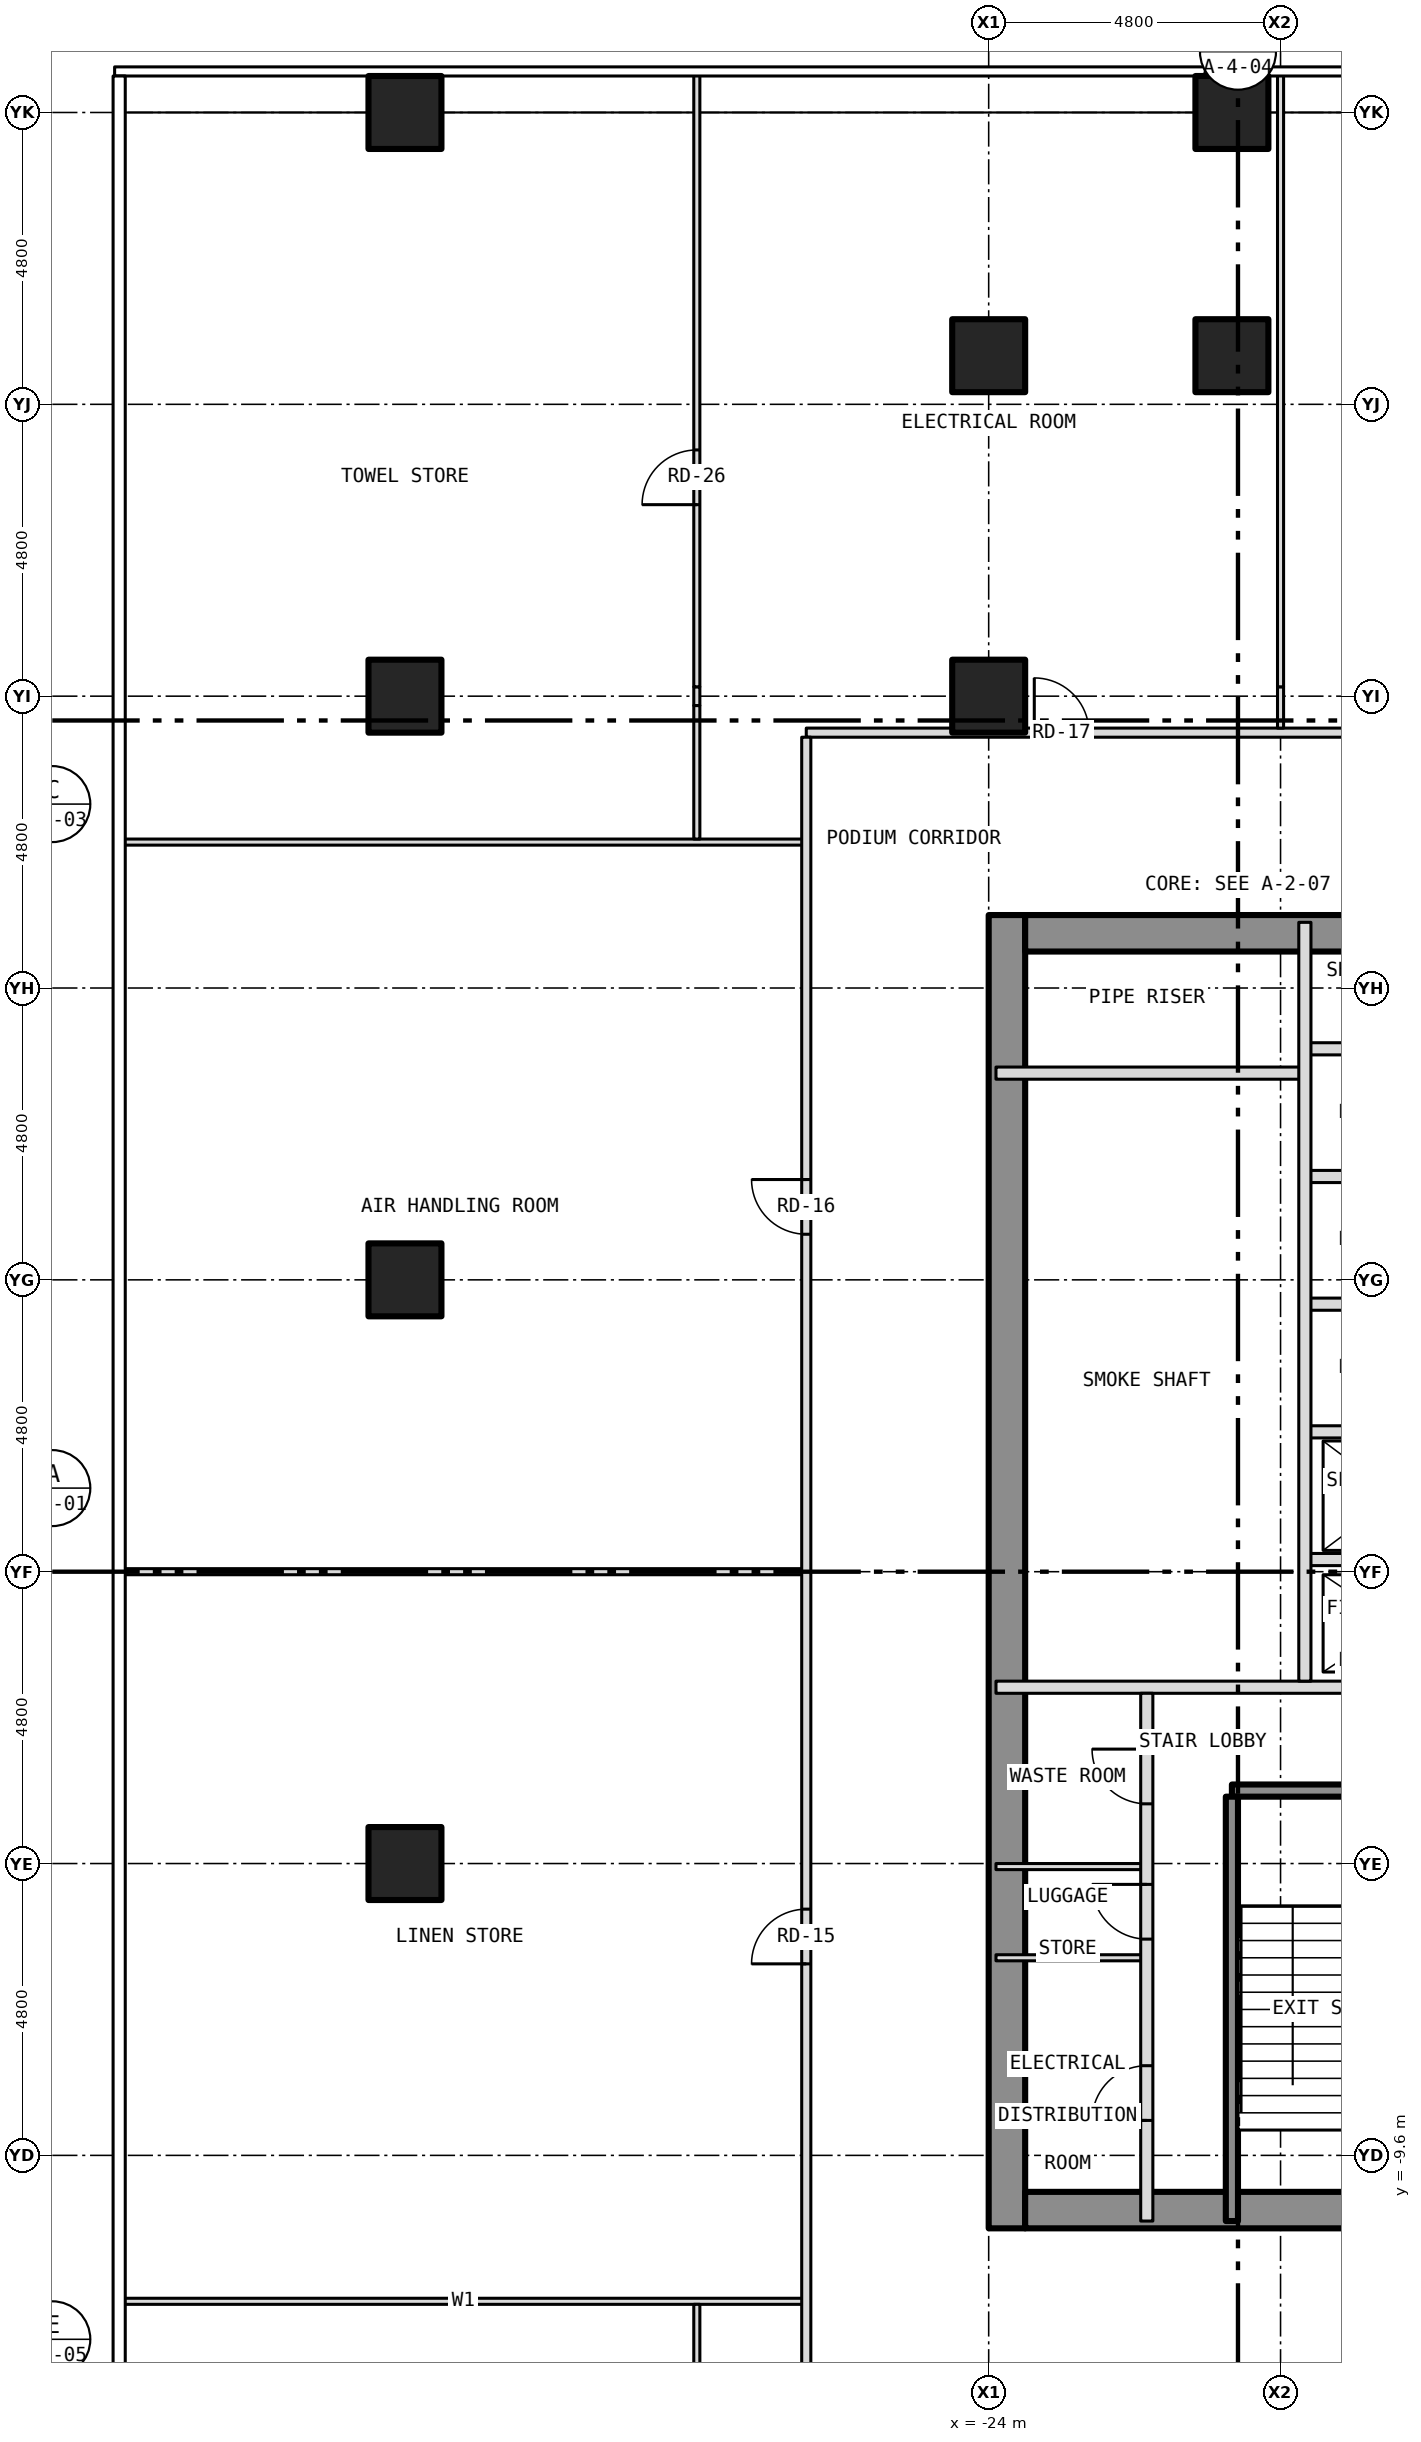
"""IFC4 building model, lengths in metres.
Left out: names, types, materials, properties, quantities, classifications, styles, units other than length and angle.
Written with IfcOpenShell. Run it as: python <this file> out.ifc"""

import sys

from ifc_helpers import new_model, si_unit, direction, frame, frame_2d, origin, origin_2d, place, context, subcontext, project, spatial, rectangle, hollow_rectangle, extrude, element, fill, save


model = new_model("IFC4")
c1 = context("Model", 3, precision=1e-05, world=origin(), true_north=direction((0.0, 1.0)))
c2 = subcontext(c1, "Body", "Model", "MODEL_VIEW")
j1 = project(units=[si_unit("LENGTHUNIT", "METRE"), si_unit("PLANEANGLEUNIT", "RADIAN")], contexts=[c1])
p1 = place(None, origin())
s1 = spatial("IfcSite", under=j1, at=p1, CompositionType="ELEMENT")
p2 = place(p1, origin())
s2 = spatial("IfcBuilding", under=s1, at=p2, CompositionType="ELEMENT")
p3 = place(p2, frame((0.0, 0.0, 24.5)))
s3 = spatial("IfcBuildingStorey", under=s2, at=p3, CompositionType="ELEMENT", Elevation=24.5)
for number, where, z_axis, x_axis in (
    (1, (-33.6, -4.8, -0.2), (0.0, 0.0, 1.0), (1.0, 0.0, 0.0)),
    (2, (-33.6, 4.8, -0.2), (0.0, 0.0, 1.0), (1.0, 0.0, 0.0)),
    (3, (-33.6, 14.4, -0.2), (0.0, 0.0, 1.0), (1.0, 0.0, 0.0)),
    (4, (-33.6, 24.0, -0.2), (0.0, 0.0, 1.0), (1.0, 0.0, 0.0)),
    (5, (-20.0, 24.0, -0.2), (0.0, 0.0, 1.0), (1.0, 0.0, 0.0)),
    (6, (-24.0, 14.4, -0.2), (0.0, 0.0, 1.0), (1.0, 0.0, 0.0)),
    (7, (-24.0, 20.0, -0.2), (0.0, 0.0, 1.0), (1.0, 0.0, 0.0)),
    (8, (-20.0, 20.0, -0.2), (0.0, 0.0, 1.0), (1.0, 0.0, 0.0)),
):
    element("IfcColumn", number, at=place(p3, frame(where, z_axis=z_axis, x_axis=x_axis)), inside=s3, PredefinedType="COLUMN", context=c2, shape_type="SweptSolid", body=[
        extrude(hollow_rectangle(XDim=1.2, YDim=1.2, WallThickness=0.07, at=origin_2d()), origin(), (0.0, 0.0, 1.0), 4.5),
    ])
p4 = place(p3, frame((-23.7, -10.8, 0.0), z_axis=(0.0, 0.0, 1.0), x_axis=(0.0, 1.0, 0.0)))
e9 = element("IfcWall", 9, at=p4, inside=s3, PredefinedType="SHEAR", context=c2, shape_type="SweptSolid", body=[
    extrude(rectangle(XDim=21.6, YDim=0.6, at=frame_2d((10.8, 0.0))), origin(), (0.0, 0.0, 1.0), 4.2),
])
for number, where, z_axis, x_axis in (
    (10, (-23.4, 10.5, 0.0), (0.0, 0.0, 1.0), (1.0, 0.0, 0.0)),
    (11, (-23.4, -10.5, 0.0), (0.0, 0.0, 1.0), (1.0, 0.0, 0.0)),
):
    element("IfcWall", number, at=place(p3, frame(where, z_axis=z_axis, x_axis=x_axis)), inside=s3, PredefinedType="SHEAR", context=c2, shape_type="SweptSolid", body=[
        extrude(rectangle(XDim=7.0, YDim=0.6, at=frame_2d((3.5, 0.0))), origin(), (0.0, 0.0, 1.0), 4.2),
    ])
p5 = place(p3, frame((-38.28, -12.0, 0.0), z_axis=(0.0, 0.0, 1.0), x_axis=(1.0, 0.0, 0.0)))
e12 = element("IfcWall", 12, at=p5, inside=s3, PredefinedType="PARTITIONING", context=c2, shape_type="SweptSolid", body=[
    extrude(rectangle(XDim=11.28, YDim=0.1, at=frame_2d((5.64, 0.0))), origin(), (0.0, 0.0, 1.0), 4.3),
])
for number, where, z_axis, x_axis in (
    (13, (-23.88, -6.35, 0.0), (0.0, 0.0, 1.0), (1.0, 0.0, 0.0)),
    (14, (-23.88, -4.85, 0.0), (0.0, 0.0, 1.0), (1.0, 0.0, 0.0)),
):
    element("IfcWall", number, at=place(p3, frame(where, z_axis=z_axis, x_axis=x_axis)), inside=s3, PredefinedType="PARTITIONING", context=c2, shape_type="SweptSolid", body=[
        extrude(rectangle(XDim=2.48, YDim=0.1, at=frame_2d((1.24, 0.0))), origin(), (0.0, 0.0, 1.0), 4.2),
    ])
p6 = place(p3, frame((-20.0, -3.6, 0.0), z_axis=(0.0, 0.0, 1.0), x_axis=(1.0, 0.0, 0.0)))
e15 = element("IfcWall", 15, at=p6, inside=s3, PredefinedType="SHEAR", context=c2, shape_type="SweptSolid", body=[
    extrude(rectangle(XDim=4.08, YDim=0.2, at=frame_2d((2.04, 0.0))), origin(), (0.0, 0.0, 1.0), 4.2),
])
p7 = place(p3, frame((-23.88, -1.9, 0.0), z_axis=(0.0, 0.0, 1.0), x_axis=(1.0, 0.0, 0.0)))
e16 = element("IfcWall", 16, at=p7, inside=s3, PredefinedType="PARTITIONING", context=c2, shape_type="SweptSolid", body=[
    extrude(rectangle(XDim=7.96, YDim=0.2, at=frame_2d((3.98, 0.0))), origin(), (0.0, 0.0, 1.0), 4.2),
])
p8 = place(p3, frame((-38.28, 0.0, 0.0), z_axis=(0.0, 0.0, 1.0), x_axis=(1.0, 0.0, 0.0)))
e17 = element("IfcWall", 17, at=p8, inside=s3, PredefinedType="PARTITIONING", context=c2, shape_type="SweptSolid", body=[
    extrude(rectangle(XDim=11.28, YDim=0.1, at=frame_2d((5.64, 0.0))), origin(), (0.0, 0.0, 1.0), 4.3),
])
for number, where, z_axis, x_axis in (
    (18, (-18.8, 0.2, 0.0), (0.0, 0.0, 1.0), (1.0, 0.0, 0.0)),
    (19, (-18.8, 2.3, 0.0), (0.0, 0.0, 1.0), (1.0, 0.0, 0.0)),
    (20, (-18.8, 4.4, 0.0), (0.0, 0.0, 1.0), (1.0, 0.0, 0.0)),
    (21, (-18.8, 6.5, 0.0), (0.0, 0.0, 1.0), (1.0, 0.0, 0.0)),
):
    element("IfcWall", number, at=place(p3, frame(where, z_axis=z_axis, x_axis=x_axis)), inside=s3, PredefinedType="PARTITIONING", context=c2, shape_type="SweptSolid", body=[
        extrude(rectangle(XDim=2.88, YDim=0.2, at=frame_2d((1.44, 0.0))), origin(), (0.0, 0.0, 1.0), 4.2),
    ])
p9 = place(p3, frame((-23.88, 8.2, 0.0), z_axis=(0.0, 0.0, 1.0), x_axis=(1.0, 0.0, 0.0)))
e22 = element("IfcWall", 22, at=p9, inside=s3, PredefinedType="PARTITIONING", context=c2, shape_type="SweptSolid", body=[
    extrude(rectangle(XDim=5.08, YDim=0.2, at=frame_2d((2.54, 0.0))), origin(), (0.0, 0.0, 1.0), 4.2),
])
p10 = place(p3, frame((-18.8, 8.6, 0.0), z_axis=(0.0, 0.0, 1.0), x_axis=(1.0, 0.0, 0.0)))
e23 = element("IfcWall", 23, at=p10, inside=s3, PredefinedType="PARTITIONING", context=c2, shape_type="SweptSolid", body=[
    extrude(rectangle(XDim=2.88, YDim=0.2, at=frame_2d((1.44, 0.0))), origin(), (0.0, 0.0, 1.0), 4.2),
])
p11 = place(p3, frame((-38.28, 12.0, 0.0), z_axis=(0.0, 0.0, 1.0), x_axis=(1.0, 0.0, 0.0)))
e24 = element("IfcWall", 24, at=p11, inside=s3, PredefinedType="PARTITIONING", context=c2, shape_type="SweptSolid", body=[
    extrude(rectangle(XDim=11.28, YDim=0.1, at=frame_2d((5.64, 0.0))), origin(), (0.0, 0.0, 1.0), 4.3),
])
p12 = place(p3, frame((-27.0, 13.8, 0.0), z_axis=(0.0, 0.0, 1.0), x_axis=(1.0, 0.0, 0.0)))
e25 = element("IfcWall", 25, at=p12, inside=s3, PredefinedType="PARTITIONING", context=c2, shape_type="SweptSolid", body=[
    extrude(rectangle(XDim=54.0, YDim=0.15, at=frame_2d((27.0, 0.0))), origin(), (0.0, 0.0, 1.0), 4.3),
])
p13 = place(p12, frame((42.15, 0.0, 0.0)))
e26 = element("IfcOpeningElement", 26, at=p13, cuts=e25, PredefinedType="OPENING", context=c2, shape_type="SweptSolid", body=[
    extrude(rectangle(XDim=0.9, YDim=2.1, at=frame_2d((0.45, 1.05))), frame((0.0, 0.087, 0.0), z_axis=(0.0, -1.0, 0.0), x_axis=(1.0, 0.0, 0.0)), (0.0, 0.0, 1.0), 0.174),
])
p14 = place(p12, frame((3.75, 0.0, 0.0)))
e27 = element("IfcOpeningElement", 27, at=p14, cuts=e25, PredefinedType="OPENING", context=c2, shape_type="SweptSolid", body=[
    extrude(rectangle(XDim=0.9, YDim=2.1, at=frame_2d((0.45, 1.05))), frame((0.0, 0.087, 0.0), z_axis=(0.0, -1.0, 0.0), x_axis=(1.0, 0.0, 0.0)), (0.0, 0.0, 1.0), 0.174),
])
p15 = place(p12, frame((49.35, 0.0, 0.0)))
e28 = element("IfcOpeningElement", 28, at=p15, cuts=e25, PredefinedType="OPENING", context=c2, shape_type="SweptSolid", body=[
    extrude(rectangle(XDim=0.9, YDim=2.1, at=frame_2d((0.45, 1.05))), frame((0.0, 0.087, 0.0), z_axis=(0.0, -1.0, 0.0), x_axis=(1.0, 0.0, 0.0)), (0.0, 0.0, 1.0), 0.174),
])
p16 = place(p12, frame((13.35, 0.0, 0.0)))
e29 = element("IfcOpeningElement", 29, at=p16, cuts=e25, PredefinedType="OPENING", context=c2, shape_type="SweptSolid", body=[
    extrude(rectangle(XDim=0.9, YDim=2.1, at=frame_2d((0.45, 1.05))), frame((0.0, 0.087, 0.0), z_axis=(0.0, -1.0, 0.0), x_axis=(1.0, 0.0, 0.0)), (0.0, 0.0, 1.0), 0.174),
])
p17 = place(p12, frame((32.55, 0.0, 0.0)))
e30 = element("IfcOpeningElement", 30, at=p17, cuts=e25, PredefinedType="OPENING", context=c2, shape_type="SweptSolid", body=[
    extrude(rectangle(XDim=0.9, YDim=2.1, at=frame_2d((0.45, 1.05))), frame((0.0, 0.087, 0.0), z_axis=(0.0, -1.0, 0.0), x_axis=(1.0, 0.0, 0.0)), (0.0, 0.0, 1.0), 0.174),
])
for number, where, z_axis, x_axis in (
    (31, (-28.8, -14.246, 0.0), (0.0, 0.0, 1.0), (0.0, 1.0, 0.0)),
    (32, (-28.8, 12.05, 0.0), (0.0, 0.0, 1.0), (0.0, 1.0, 0.0)),
):
    element("IfcWall", number, at=place(p3, frame(where, z_axis=z_axis, x_axis=x_axis)), inside=s3, PredefinedType="PARTITIONING", context=c2, shape_type="SweptSolid", body=[
        extrude(rectangle(XDim=2.196, YDim=0.1, at=frame_2d((1.098, 0.0))), origin(), (0.0, 0.0, 1.0), 3.683),
    ])
p18 = place(p3, frame((-28.8, 14.246, 0.0), z_axis=(0.0, 0.0, 1.0), x_axis=(0.0, 1.0, 0.0)))
e33 = element("IfcWall", 33, at=p18, inside=s3, PredefinedType="PARTITIONING", context=c2, shape_type="SweptSolid", body=[
    extrude(rectangle(XDim=0.308, YDim=0.1, at=frame_2d((0.154, 0.0))), origin(), (0.0, 0.0, 1.0), 4.3),
])
p19 = place(p3, frame((-28.8, 14.554, 0.0), z_axis=(0.0, 0.0, 1.0), x_axis=(0.0, 1.0, 0.0)))
e34 = element("IfcWall", 34, at=p19, inside=s3, PredefinedType="PARTITIONING", context=c2, shape_type="SweptSolid", body=[
    extrude(rectangle(XDim=10.076, YDim=0.1, at=frame_2d((5.038, 0.0))), origin(), (0.0, 0.0, 1.0), 3.683),
])
p20 = place(p19, frame((2.996, 0.0, 0.0)))
e35 = element("IfcOpeningElement", 35, at=p20, cuts=e34, PredefinedType="OPENING", context=c2, shape_type="SweptSolid", body=[
    extrude(rectangle(XDim=0.9, YDim=2.1, at=frame_2d((0.45, 1.05))), frame((0.0, 0.062, 0.0), z_axis=(0.0, -1.0, 0.0), x_axis=(1.0, 0.0, 0.0)), (0.0, 0.0, 1.0), 0.124),
])
p21 = place(p3, frame((-27.0, -13.725, 0.0), z_axis=(0.0, 0.0, 1.0), x_axis=(0.0, 1.0, 0.0)))
e36 = element("IfcWall", 36, at=p21, inside=s3, PredefinedType="PARTITIONING", context=c2, shape_type="SweptSolid", body=[
    extrude(rectangle(XDim=27.45, YDim=0.15, at=frame_2d((13.725, 0.0))), origin(), (0.0, 0.0, 1.0), 4.3),
])
p22 = place(p21, frame((7.275, 0.0, 0.0)))
e37 = element("IfcOpeningElement", 37, at=p22, cuts=e36, PredefinedType="OPENING", context=c2, shape_type="SweptSolid", body=[
    extrude(rectangle(XDim=0.9, YDim=2.1, at=frame_2d((0.45, 1.05))), frame((0.0, 0.087, 0.0), z_axis=(0.0, -1.0, 0.0), x_axis=(1.0, 0.0, 0.0)), (0.0, 0.0, 1.0), 0.174),
])
p23 = place(p21, frame((19.275, 0.0, 0.0)))
e38 = element("IfcOpeningElement", 38, at=p23, cuts=e36, PredefinedType="OPENING", context=c2, shape_type="SweptSolid", body=[
    extrude(rectangle(XDim=0.9, YDim=2.1, at=frame_2d((0.45, 1.05))), frame((0.0, 0.087, 0.0), z_axis=(0.0, -1.0, 0.0), x_axis=(1.0, 0.0, 0.0)), (0.0, 0.0, 1.0), 0.174),
])
p24 = place(p3, frame((-21.4, -10.68, 0.0), z_axis=(0.0, 0.0, 1.0), x_axis=(0.0, 1.0, 0.0)))
e39 = element("IfcWall", 39, at=p24, inside=s3, PredefinedType="PARTITIONING", context=c2, shape_type="SweptSolid", body=[
    extrude(rectangle(XDim=8.68, YDim=0.2, at=frame_2d((4.34, 0.0))), origin(), (0.0, 0.0, 1.0), 4.2),
])
p25 = place(p24, frame((1.655, 0.0, 0.0)))
e40 = element("IfcOpeningElement", 40, at=p25, cuts=e39, PredefinedType="OPENING", context=c2, shape_type="SweptSolid", body=[
    extrude(rectangle(XDim=0.9, YDim=2.1, at=frame_2d((0.45, 1.05))), frame((0.0, 0.112, 0.0), z_axis=(0.0, -1.0, 0.0), x_axis=(1.0, 0.0, 0.0)), (0.0, 0.0, 1.0), 0.224),
])
p26 = place(p24, frame((4.637, 0.0, 0.0)))
e41 = element("IfcOpeningElement", 41, at=p26, cuts=e39, PredefinedType="OPENING", context=c2, shape_type="SweptSolid", body=[
    extrude(rectangle(XDim=0.9, YDim=2.1, at=frame_2d((0.45, 1.05))), frame((0.0, 0.112, 0.0), z_axis=(0.0, -1.0, 0.0), x_axis=(1.0, 0.0, 0.0)), (0.0, 0.0, 1.0), 0.224),
])
p27 = place(p24, frame((6.862, 0.0, 0.0)))
e42 = element("IfcOpeningElement", 42, at=p27, cuts=e39, PredefinedType="OPENING", context=c2, shape_type="SweptSolid", body=[
    extrude(rectangle(XDim=0.9, YDim=2.1, at=frame_2d((0.45, 1.05))), frame((0.0, 0.112, 0.0), z_axis=(0.0, -1.0, 0.0), x_axis=(1.0, 0.0, 0.0)), (0.0, 0.0, 1.0), 0.224),
])
p28 = place(p3, frame((-20.0, -10.68, 0.0), z_axis=(0.0, 0.0, 1.0), x_axis=(0.0, 1.0, 0.0)))
e43 = element("IfcWall", 43, at=p28, inside=s3, PredefinedType="SHEAR", context=c2, shape_type="SweptSolid", body=[
    extrude(rectangle(XDim=6.98, YDim=0.2, at=frame_2d((3.49, 0.0))), origin(), (0.0, 0.0, 1.0), 4.2),
])
p29 = place(p3, frame((-19.2, 13.875, 0.0), z_axis=(0.0, 0.0, 1.0), x_axis=(0.0, 1.0, 0.0)))
e44 = element("IfcWall", 44, at=p29, inside=s3, PredefinedType="PARTITIONING", context=c2, shape_type="SweptSolid", body=[
    extrude(rectangle(XDim=0.679, YDim=0.1, at=frame_2d((0.339, 0.0))), origin(), (0.0, 0.0, 1.0), 4.3),
])
p30 = place(p3, frame((-19.2, 14.554, 0.0), z_axis=(0.0, 0.0, 1.0), x_axis=(0.0, 1.0, 0.0)))
e45 = element("IfcWall", 45, at=p30, inside=s3, PredefinedType="PARTITIONING", context=c2, shape_type="SweptSolid", body=[
    extrude(rectangle(XDim=10.076, YDim=0.1, at=frame_2d((5.038, 0.0))), origin(), (0.0, 0.0, 1.0), 3.683),
])
p31 = place(p3, frame((-18.8, -1.8, 0.0), z_axis=(0.0, 0.0, 1.0), x_axis=(0.0, 1.0, 0.0)))
e46 = element("IfcWall", 46, at=p31, inside=s3, PredefinedType="PARTITIONING", context=c2, shape_type="SweptSolid", body=[
    extrude(rectangle(XDim=12.48, YDim=0.2, at=frame_2d((6.24, 0.0))), origin(), (0.0, 0.0, 1.0), 4.2),
])
p32 = place(p25, origin())
e47 = element("IfcDoor", 47, at=p32, inside=s3, OperationType="SINGLE_SWING_LEFT", PredefinedType="DOOR", context=c2, shape_type="SweptSolid", body=[
    extrude(rectangle(XDim=0.9, YDim=2.1, at=frame_2d((0.45, 1.05))), frame((0.0, 0.025, 0.0), z_axis=(0.0, -1.0, 0.0), x_axis=(1.0, 0.0, 0.0)), (0.0, 0.0, 1.0), 0.05),
])
fill(e40, e47)
p33 = place(p26, origin())
e48 = element("IfcDoor", 48, at=p33, inside=s3, OperationType="SINGLE_SWING_RIGHT", PredefinedType="DOOR", context=c2, shape_type="SweptSolid", body=[
    extrude(rectangle(XDim=0.9, YDim=2.1, at=frame_2d((0.45, 1.05))), frame((0.0, 0.025, 0.0), z_axis=(0.0, -1.0, 0.0), x_axis=(1.0, 0.0, 0.0)), (0.0, 0.0, 1.0), 0.05),
])
fill(e41, e48)
p34 = place(p27, origin())
e49 = element("IfcDoor", 49, at=p34, inside=s3, OperationType="SINGLE_SWING_RIGHT", PredefinedType="DOOR", context=c2, shape_type="SweptSolid", body=[
    extrude(rectangle(XDim=0.9, YDim=2.1, at=frame_2d((0.45, 1.05))), frame((0.0, 0.025, 0.0), z_axis=(0.0, -1.0, 0.0), x_axis=(1.0, 0.0, 0.0)), (0.0, 0.0, 1.0), 0.05),
])
fill(e42, e49)
p35 = place(p22, origin())
e50 = element("IfcDoor", 50, at=p35, inside=s3, OperationType="SINGLE_SWING_LEFT", PredefinedType="DOOR", context=c2, shape_type="SweptSolid", body=[
    extrude(rectangle(XDim=0.9, YDim=2.1, at=frame_2d((0.45, 1.05))), frame((0.0, 0.025, 0.0), z_axis=(0.0, -1.0, 0.0), x_axis=(1.0, 0.0, 0.0)), (0.0, 0.0, 1.0), 0.05),
])
fill(e37, e50)
p36 = place(p23, origin())
e51 = element("IfcDoor", 51, at=p36, inside=s3, OperationType="SINGLE_SWING_RIGHT", PredefinedType="DOOR", context=c2, shape_type="SweptSolid", body=[
    extrude(rectangle(XDim=0.9, YDim=2.1, at=frame_2d((0.45, 1.05))), frame((0.0, 0.025, 0.0), z_axis=(0.0, -1.0, 0.0), x_axis=(1.0, 0.0, 0.0)), (0.0, 0.0, 1.0), 0.05),
])
fill(e38, e51)
p37 = place(p14, origin())
e52 = element("IfcDoor", 52, at=p37, inside=s3, OperationType="SINGLE_SWING_LEFT", PredefinedType="DOOR", context=c2, shape_type="SweptSolid", body=[
    extrude(rectangle(XDim=0.9, YDim=2.1, at=frame_2d((0.45, 1.05))), frame((0.0, 0.025, 0.0), z_axis=(0.0, -1.0, 0.0), x_axis=(1.0, 0.0, 0.0)), (0.0, 0.0, 1.0), 0.05),
])
fill(e27, e52)
p38 = place(p20, origin())
e53 = element("IfcDoor", 53, at=p38, inside=s3, OperationType="SINGLE_SWING_LEFT", PredefinedType="DOOR", context=c2, shape_type="SweptSolid", body=[
    extrude(rectangle(XDim=0.9, YDim=2.1, at=frame_2d((0.45, 1.05))), frame((0.0, 0.025, 0.0), z_axis=(0.0, -1.0, 0.0), x_axis=(1.0, 0.0, 0.0)), (0.0, 0.0, 1.0), 0.05),
])
fill(e35, e53)
save(model, sys.argv[1])
